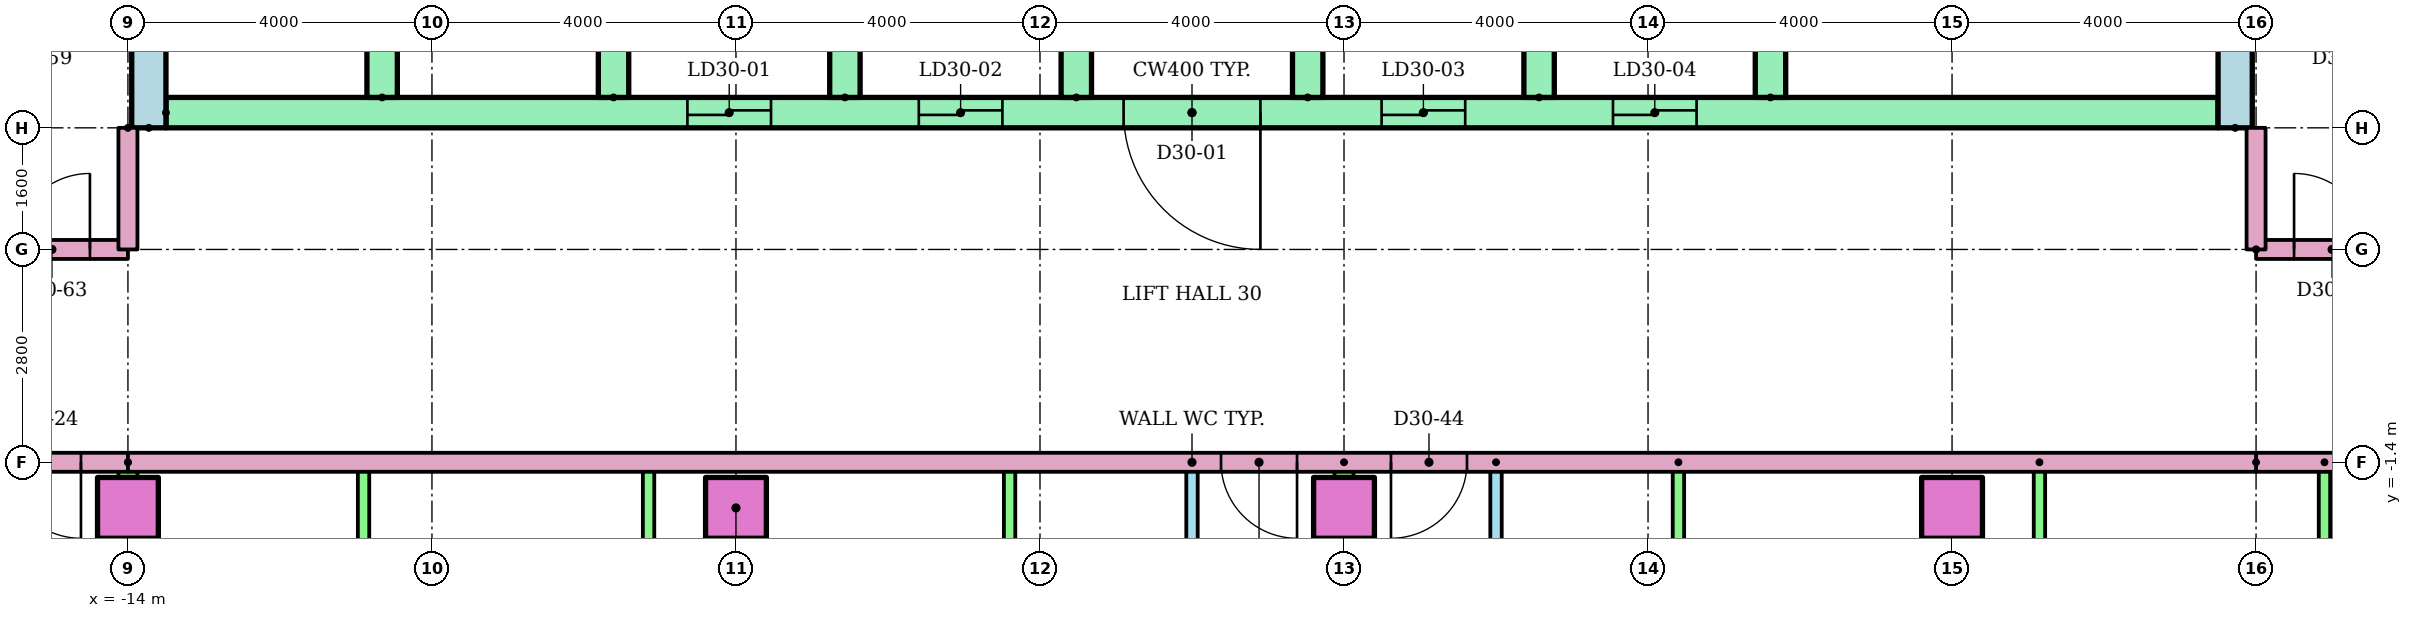
"""IFC4 building model, lengths in metres.
Left out: names, types, materials, properties, quantities, classifications, styles, units other than length and angle.
Written with IfcOpenShell. Run it as: python <this file> out.ifc"""

import sys

from ifc_helpers import new_model, si_unit, direction, frame, frame_2d, origin, origin_2d, place, context, subcontext, project, spatial, rectangle, extrude, element, fill, save


model = new_model("IFC4")
c1 = context("Model", 3, precision=1e-05, world=origin(), true_north=direction((0.0, 1.0)))
c2 = subcontext(c1, "Body", "Model", "MODEL_VIEW")
j1 = project(units=[si_unit("LENGTHUNIT", "METRE"), si_unit("PLANEANGLEUNIT", "RADIAN")], contexts=[c1])
p1 = place(None, origin())
s1 = spatial("IfcSite", under=j1, at=p1, CompositionType="ELEMENT")
p2 = place(p1, origin())
s2 = spatial("IfcBuilding", under=s1, at=p2, CompositionType="ELEMENT")
p3 = place(p2, frame((0.0, 0.0, 119.8)))
s3 = spatial("IfcBuildingStorey", under=s2, at=p3, CompositionType="ELEMENT", Elevation=119.8)
for number, where in (
    (1, (-14.0, -2.0, 0.0)),
    (2, (-6.0, -2.0, 0.0)),
    (3, (2.0, -2.0, 0.0)),
    (4, (10.0, -2.0, 0.0)),
):
    element("IfcColumn", number, at=place(p3, frame(where)), inside=s3, PredefinedType="COLUMN", context=c2, shape_type="SweptSolid", body=[
        extrude(rectangle(XDim=0.8, YDim=0.8, at=origin_2d()), origin(), (0.0, 0.0, 1.0), 3.2),
    ])
for number, where, z_axis, x_axis in (
    (5, (-13.725, 3.0, 0.0), (0.0, 0.0, 1.0), (0.0, 1.0, 0.0)),
    (6, (13.725, 3.0, 0.0), (0.0, 0.0, 1.0), (0.0, 1.0, 0.0)),
):
    element("IfcWall", number, at=place(p3, frame(where, z_axis=z_axis, x_axis=x_axis)), inside=s3, PredefinedType="SHEAR", context=c2, shape_type="SweptSolid", body=[
        extrude(rectangle(XDim=17.0, YDim=0.45, at=frame_2d((8.5, 0.0))), origin(), (0.0, 0.0, 1.0), 2.92),
    ])
p4 = place(p3, frame((-13.5, 3.2, 0.0)))
e7 = element("IfcWall", 7, at=p4, inside=s3, PredefinedType="SHEAR", context=c2, shape_type="SweptSolid", body=[
    extrude(rectangle(XDim=27.0, YDim=0.4, at=frame_2d((13.5, 0.0))), origin(), (0.0, 0.0, 1.0), 2.92),
])
p5 = place(p4, frame((6.861, 0.0, 0.0)))
e8 = element("IfcOpeningElement", 8, at=p5, cuts=e7, PredefinedType="OPENING", context=c2, shape_type="SweptSolid", body=[
    extrude(rectangle(XDim=1.1, YDim=2.1, at=frame_2d((0.55, 1.05))), frame((0.0, 0.21, 0.0), z_axis=(0.0, -1.0, 0.0), x_axis=(1.0, 0.0, 0.0)), (0.0, 0.0, 1.0), 0.42),
])
p6 = place(p4, frame((9.906, 0.0, 0.0)))
e9 = element("IfcOpeningElement", 9, at=p6, cuts=e7, PredefinedType="OPENING", context=c2, shape_type="SweptSolid", body=[
    extrude(rectangle(XDim=1.1, YDim=2.1, at=frame_2d((0.55, 1.05))), frame((0.0, 0.21, 0.0), z_axis=(0.0, -1.0, 0.0), x_axis=(1.0, 0.0, 0.0)), (0.0, 0.0, 1.0), 0.42),
])
p7 = place(p4, frame((15.994, 0.0, 0.0)))
e10 = element("IfcOpeningElement", 10, at=p7, cuts=e7, PredefinedType="OPENING", context=c2, shape_type="SweptSolid", body=[
    extrude(rectangle(XDim=1.1, YDim=2.1, at=frame_2d((0.55, 1.05))), frame((0.0, 0.21, 0.0), z_axis=(0.0, -1.0, 0.0), x_axis=(1.0, 0.0, 0.0)), (0.0, 0.0, 1.0), 0.42),
])
p8 = place(p4, frame((19.039, 0.0, 0.0)))
e11 = element("IfcOpeningElement", 11, at=p8, cuts=e7, PredefinedType="OPENING", context=c2, shape_type="SweptSolid", body=[
    extrude(rectangle(XDim=1.1, YDim=2.1, at=frame_2d((0.55, 1.05))), frame((0.0, 0.21, 0.0), z_axis=(0.0, -1.0, 0.0), x_axis=(1.0, 0.0, 0.0)), (0.0, 0.0, 1.0), 0.42),
])
p9 = place(p4, frame((12.6, 0.0, 0.0)))
e12 = element("IfcOpeningElement", 12, at=p9, cuts=e7, PredefinedType="OPENING", context=c2, shape_type="SweptSolid", body=[
    extrude(rectangle(XDim=1.8, YDim=2.1, at=frame_2d((0.9, 1.05))), frame((0.0, 0.21, 0.0), z_axis=(0.0, -1.0, 0.0), x_axis=(1.0, 0.0, 0.0)), (0.0, 0.0, 1.0), 0.42),
])
for number, where, z_axis, x_axis in (
    (13, (-10.656, 3.4, 0.0), (0.0, 0.0, 1.0), (0.0, 1.0, 0.0)),
    (14, (-7.611, 3.4, 0.0), (0.0, 0.0, 1.0), (0.0, 1.0, 0.0)),
    (15, (-4.567, 3.4, 0.0), (0.0, 0.0, 1.0), (0.0, 1.0, 0.0)),
    (16, (-1.522, 3.4, 0.0), (0.0, 0.0, 1.0), (0.0, 1.0, 0.0)),
    (17, (1.522, 3.4, 0.0), (0.0, 0.0, 1.0), (0.0, 1.0, 0.0)),
    (18, (4.567, 3.4, 0.0), (0.0, 0.0, 1.0), (0.0, 1.0, 0.0)),
    (19, (7.611, 3.4, 0.0), (0.0, 0.0, 1.0), (0.0, 1.0, 0.0)),
):
    element("IfcWall", number, at=place(p3, frame(where, z_axis=z_axis, x_axis=x_axis)), inside=s3, PredefinedType="SHEAR", context=c2, shape_type="SweptSolid", body=[
        extrude(rectangle(XDim=3.0, YDim=0.4, at=frame_2d((1.5, 0.0))), origin(), (0.0, 0.0, 1.0), 2.92),
    ])
p10 = place(p3, frame((0.0, -8.0, 0.0), z_axis=(0.0, 0.0, 1.0), x_axis=(0.0, 1.0, 0.0)))
e20 = element("IfcWall", 20, at=p10, inside=s3, PredefinedType="PARTITIONING", context=c2, shape_type="SweptSolid", body=[
    extrude(rectangle(XDim=6.6, YDim=0.15, at=frame_2d((3.3, 0.0))), origin(), (0.0, 0.0, 1.0), 2.4),
])
p11 = place(p10, frame((4.275, 0.0, 0.0)))
e21 = element("IfcOpeningElement", 21, at=p11, cuts=e20, PredefinedType="OPENING", context=c2, shape_type="SweptSolid", body=[
    extrude(rectangle(XDim=0.9, YDim=2.1, at=frame_2d((0.45, 1.05))), frame((0.0, 0.085, 0.0), z_axis=(0.0, -1.0, 0.0), x_axis=(1.0, 0.0, 0.0)), (0.0, 0.0, 1.0), 0.17),
])
p12 = place(p10, frame((1.025, 0.0, 0.0)))
e22 = element("IfcOpeningElement", 22, at=p12, cuts=e20, PredefinedType="OPENING", context=c2, shape_type="SweptSolid", body=[
    extrude(rectangle(XDim=0.8, YDim=2.1, at=frame_2d((0.4, 1.05))), frame((0.0, 0.085, 0.0), z_axis=(0.0, -1.0, 0.0), x_axis=(1.0, 0.0, 0.0)), (0.0, 0.0, 1.0), 0.17),
])
for number, where, z_axis, x_axis in (
    (23, (-2.4, -8.0, 0.0), (0.0, 0.0, 1.0), (0.0, 1.0, 0.0)),
    (24, (-7.15, -8.0, 0.0), (0.0, 0.0, 1.0), (0.0, 1.0, 0.0)),
    (25, (-10.9, -8.0, 0.0), (0.0, 0.0, 1.0), (0.0, 1.0, 0.0)),
):
    element("IfcWall", number, at=place(p3, frame(where, z_axis=z_axis, x_axis=x_axis)), inside=s3, PredefinedType="PARTITIONING", context=c2, shape_type="SweptSolid", body=[
        extrude(rectangle(XDim=6.6, YDim=0.15, at=frame_2d((3.3, 0.0))), origin(), (0.0, 0.0, 1.0), 2.4),
    ])
p13 = place(p3, frame((-14.0, -1.4, 0.0), z_axis=(0.0, 0.0, 1.0), x_axis=(0.0, -1.0, 0.0)))
e26 = element("IfcWall", 26, at=p13, inside=s3, PredefinedType="PARTITIONING", context=c2, shape_type="SweptSolid", body=[
    extrude(rectangle(XDim=14.91, YDim=0.25, at=frame_2d((7.455, 0.0))), origin(), (0.0, 0.0, 1.0), 2.4),
])
p14 = place(p3, frame((4.0, -1.4, 0.0), z_axis=(0.0, 0.0, 1.0), x_axis=(0.0, -1.0, 0.0)))
e27 = element("IfcWall", 27, at=p14, inside=s3, PredefinedType="PARTITIONING", context=c2, shape_type="SweptSolid", body=[
    extrude(rectangle(XDim=6.6, YDim=0.15, at=frame_2d((3.3, 0.0))), origin(), (0.0, 0.0, 1.0), 2.4),
])
p15 = place(p14, frame((1.425, 0.0, 0.0)))
e28 = element("IfcOpeningElement", 28, at=p15, cuts=e27, PredefinedType="OPENING", context=c2, shape_type="SweptSolid", body=[
    extrude(rectangle(XDim=0.9, YDim=2.1, at=frame_2d((0.45, 1.05))), frame((0.0, 0.085, 0.0), z_axis=(0.0, -1.0, 0.0), x_axis=(1.0, 0.0, 0.0)), (0.0, 0.0, 1.0), 0.17),
])
p16 = place(p14, frame((4.775, 0.0, 0.0)))
e29 = element("IfcOpeningElement", 29, at=p16, cuts=e27, PredefinedType="OPENING", context=c2, shape_type="SweptSolid", body=[
    extrude(rectangle(XDim=0.8, YDim=2.1, at=frame_2d((0.4, 1.05))), frame((0.0, 0.085, 0.0), z_axis=(0.0, -1.0, 0.0), x_axis=(1.0, 0.0, 0.0)), (0.0, 0.0, 1.0), 0.17),
])
for number, where, z_axis, x_axis in (
    (30, (6.4, -1.4, 0.0), (0.0, 0.0, 1.0), (0.0, -1.0, 0.0)),
    (31, (11.15, -1.4, 0.0), (0.0, 0.0, 1.0), (0.0, -1.0, 0.0)),
    (32, (14.9, -1.4, 0.0), (0.0, 0.0, 1.0), (0.0, -1.0, 0.0)),
):
    element("IfcWall", number, at=place(p3, frame(where, z_axis=z_axis, x_axis=x_axis)), inside=s3, PredefinedType="PARTITIONING", context=c2, shape_type="SweptSolid", body=[
        extrude(rectangle(XDim=6.6, YDim=0.15, at=frame_2d((3.3, 0.0))), origin(), (0.0, 0.0, 1.0), 2.4),
    ])
p17 = place(p3, frame((2.0, -1.4, 0.0), z_axis=(0.0, 0.0, 1.0), x_axis=(0.0, -1.0, 0.0)))
e33 = element("IfcWall", 33, at=p17, inside=s3, PredefinedType="PARTITIONING", context=c2, shape_type="SweptSolid", body=[
    extrude(rectangle(XDim=14.91, YDim=0.25, at=frame_2d((7.455, 0.0))), origin(), (0.0, 0.0, 1.0), 2.4),
])
p18 = place(p3, frame((-14.0, -1.4, 0.0), z_axis=(0.0, 0.0, 1.0), x_axis=(-1.0, 0.0, 0.0)))
e34 = element("IfcWall", 34, at=p18, inside=s3, PredefinedType="PARTITIONING", context=c2, shape_type="SweptSolid", body=[
    extrude(rectangle(XDim=15.0, YDim=0.25, at=frame_2d((7.5, 0.0))), origin(), (0.0, 0.0, 1.0), 2.4),
])
p19 = place(p18, frame((8.618, 0.0, 0.0)))
e35 = element("IfcOpeningElement", 35, at=p19, cuts=e34, PredefinedType="OPENING", context=c2, shape_type="SweptSolid", body=[
    extrude(rectangle(XDim=1.0, YDim=2.1, at=frame_2d((0.5, 1.05))), frame((0.0, 0.135, 0.0), z_axis=(0.0, -1.0, 0.0), x_axis=(1.0, 0.0, 0.0)), (0.0, 0.0, 1.0), 0.27),
])
p20 = place(p18, frame((0.618, 0.0, 0.0)))
e36 = element("IfcOpeningElement", 36, at=p20, cuts=e34, PredefinedType="OPENING", context=c2, shape_type="SweptSolid", body=[
    extrude(rectangle(XDim=1.0, YDim=2.1, at=frame_2d((0.5, 1.05))), frame((0.0, 0.135, 0.0), z_axis=(0.0, -1.0, 0.0), x_axis=(1.0, 0.0, 0.0)), (0.0, 0.0, 1.0), 0.27),
])
p21 = place(p3, frame((29.0, -1.4, 0.0), z_axis=(0.0, 0.0, 1.0), x_axis=(-1.0, 0.0, 0.0)))
e37 = element("IfcWall", 37, at=p21, inside=s3, PredefinedType="PARTITIONING", context=c2, shape_type="SweptSolid", body=[
    extrude(rectangle(XDim=15.0, YDim=0.25, at=frame_2d((7.5, 0.0))), origin(), (0.0, 0.0, 1.0), 2.4),
])
p22 = place(p21, frame((9.382, 0.0, 0.0)))
e38 = element("IfcOpeningElement", 38, at=p22, cuts=e37, PredefinedType="OPENING", context=c2, shape_type="SweptSolid", body=[
    extrude(rectangle(XDim=1.0, YDim=2.1, at=frame_2d((0.5, 1.05))), frame((0.0, 0.135, 0.0), z_axis=(0.0, -1.0, 0.0), x_axis=(1.0, 0.0, 0.0)), (0.0, 0.0, 1.0), 0.27),
])
p23 = place(p3, frame((-29.0, 1.4, 0.0)))
e39 = element("IfcWall", 39, at=p23, inside=s3, PredefinedType="PARTITIONING", context=c2, shape_type="SweptSolid", body=[
    extrude(rectangle(XDim=15.0, YDim=0.25, at=frame_2d((7.5, 0.0))), origin(), (0.0, 0.0, 1.0), 2.4),
])
p24 = place(p23, frame((5.382, 0.0, 0.0)))
e40 = element("IfcOpeningElement", 40, at=p24, cuts=e39, PredefinedType="OPENING", context=c2, shape_type="SweptSolid", body=[
    extrude(rectangle(XDim=1.0, YDim=2.1, at=frame_2d((0.5, 1.05))), frame((0.0, 0.135, 0.0), z_axis=(0.0, -1.0, 0.0), x_axis=(1.0, 0.0, 0.0)), (0.0, 0.0, 1.0), 0.27),
])
p25 = place(p23, frame((13.5, 0.0, 0.0)))
e41 = element("IfcOpeningElement", 41, at=p25, cuts=e39, PredefinedType="OPENING", context=c2, shape_type="SweptSolid", body=[
    extrude(rectangle(XDim=1.0, YDim=2.1, at=frame_2d((0.5, 1.05))), frame((0.0, 0.135, 0.0), z_axis=(0.0, -1.0, 0.0), x_axis=(1.0, 0.0, 0.0)), (0.0, 0.0, 1.0), 0.27),
])
p26 = place(p3, frame((14.0, 1.4, 0.0)))
e42 = element("IfcWall", 42, at=p26, inside=s3, PredefinedType="PARTITIONING", context=c2, shape_type="SweptSolid", body=[
    extrude(rectangle(XDim=15.0, YDim=0.25, at=frame_2d((7.5, 0.0))), origin(), (0.0, 0.0, 1.0), 2.4),
])
p27 = place(p26, frame((0.5, 0.0, 0.0)))
e43 = element("IfcOpeningElement", 43, at=p27, cuts=e42, PredefinedType="OPENING", context=c2, shape_type="SweptSolid", body=[
    extrude(rectangle(XDim=1.0, YDim=2.1, at=frame_2d((0.5, 1.05))), frame((0.0, 0.135, 0.0), z_axis=(0.0, -1.0, 0.0), x_axis=(1.0, 0.0, 0.0)), (0.0, 0.0, 1.0), 0.27),
])
p28 = place(p3, frame((14.0, -1.4, 0.0), z_axis=(0.0, 0.0, 1.0), x_axis=(-1.0, 0.0, 0.0)))
e44 = element("IfcWall", 44, at=p28, inside=s3, PredefinedType="PARTITIONING", context=c2, shape_type="SweptSolid", body=[
    extrude(rectangle(XDim=28.0, YDim=0.25, at=frame_2d((14.0, 0.0))), origin(), (0.0, 0.0, 1.0), 2.4),
])
p29 = place(p28, frame((12.618, 0.0, 0.0)))
e45 = element("IfcOpeningElement", 45, at=p29, cuts=e44, PredefinedType="OPENING", context=c2, shape_type="SweptSolid", body=[
    extrude(rectangle(XDim=1.0, YDim=2.1, at=frame_2d((0.5, 1.05))), frame((0.0, 0.135, 0.0), z_axis=(0.0, -1.0, 0.0), x_axis=(1.0, 0.0, 0.0)), (0.0, 0.0, 1.0), 0.27),
])
p30 = place(p28, frame((10.382, 0.0, 0.0)))
e46 = element("IfcOpeningElement", 46, at=p30, cuts=e44, PredefinedType="OPENING", context=c2, shape_type="SweptSolid", body=[
    extrude(rectangle(XDim=1.0, YDim=2.1, at=frame_2d((0.5, 1.05))), frame((0.0, 0.135, 0.0), z_axis=(0.0, -1.0, 0.0), x_axis=(1.0, 0.0, 0.0)), (0.0, 0.0, 1.0), 0.27),
])
for number, where, z_axis, x_axis in (
    (47, (-14.0, 3.0, 0.0), (0.0, 0.0, 1.0), (0.0, -1.0, 0.0)),
    (48, (14.0, 1.4, 0.0), (0.0, 0.0, 1.0), (0.0, 1.0, 0.0)),
):
    element("IfcWall", number, at=place(p3, frame(where, z_axis=z_axis, x_axis=x_axis)), inside=s3, PredefinedType="PARTITIONING", context=c2, shape_type="SweptSolid", body=[
        extrude(rectangle(XDim=1.6, YDim=0.25, at=frame_2d((0.8, 0.0))), origin(), (0.0, 0.0, 1.0), 2.4),
    ])
p31 = place(p5, origin())
e49 = element("IfcDoor", 49, at=p31, inside=s3, OperationType="SLIDING_TO_LEFT", PredefinedType="DOOR", context=c2, shape_type="SweptSolid", body=[
    extrude(rectangle(XDim=1.1, YDim=2.1, at=frame_2d((0.55, 1.05))), frame((0.0, 0.025, 0.0), z_axis=(0.0, -1.0, 0.0), x_axis=(1.0, 0.0, 0.0)), (0.0, 0.0, 1.0), 0.05),
])
fill(e8, e49)
p32 = place(p6, origin())
e50 = element("IfcDoor", 50, at=p32, inside=s3, OperationType="SLIDING_TO_LEFT", PredefinedType="DOOR", context=c2, shape_type="SweptSolid", body=[
    extrude(rectangle(XDim=1.1, YDim=2.1, at=frame_2d((0.55, 1.05))), frame((0.0, 0.025, 0.0), z_axis=(0.0, -1.0, 0.0), x_axis=(1.0, 0.0, 0.0)), (0.0, 0.0, 1.0), 0.05),
])
fill(e9, e50)
p33 = place(p7, origin())
e51 = element("IfcDoor", 51, at=p33, inside=s3, OperationType="SLIDING_TO_LEFT", PredefinedType="DOOR", context=c2, shape_type="SweptSolid", body=[
    extrude(rectangle(XDim=1.1, YDim=2.1, at=frame_2d((0.55, 1.05))), frame((0.0, 0.025, 0.0), z_axis=(0.0, -1.0, 0.0), x_axis=(1.0, 0.0, 0.0)), (0.0, 0.0, 1.0), 0.05),
])
fill(e10, e51)
p34 = place(p8, origin())
e52 = element("IfcDoor", 52, at=p34, inside=s3, OperationType="SLIDING_TO_LEFT", PredefinedType="DOOR", context=c2, shape_type="SweptSolid", body=[
    extrude(rectangle(XDim=1.1, YDim=2.1, at=frame_2d((0.55, 1.05))), frame((0.0, 0.025, 0.0), z_axis=(0.0, -1.0, 0.0), x_axis=(1.0, 0.0, 0.0)), (0.0, 0.0, 1.0), 0.05),
])
fill(e11, e52)
p35 = place(p9, frame((1.8, 0.0, 0.0), z_axis=(0.0, 0.0, 1.0), x_axis=(-1.0, 0.0, 0.0)))
e53 = element("IfcDoor", 53, at=p35, inside=s3, OperationType="DOUBLE_DOOR_SINGLE_SWING", PredefinedType="DOOR", context=c2, shape_type="SweptSolid", body=[
    extrude(rectangle(XDim=1.8, YDim=2.1, at=frame_2d((0.9, 1.05))), frame((0.0, 0.025, 0.0), z_axis=(0.0, -1.0, 0.0), x_axis=(1.0, 0.0, 0.0)), (0.0, 0.0, 1.0), 0.05),
])
fill(e12, e53)
p36 = place(p20, origin())
e54 = element("IfcDoor", 54, at=p36, inside=s3, OperationType="SINGLE_SWING_LEFT", PredefinedType="DOOR", context=c2, shape_type="SweptSolid", body=[
    extrude(rectangle(XDim=1.0, YDim=2.1, at=frame_2d((0.5, 1.05))), frame((0.0, 0.025, 0.0), z_axis=(0.0, -1.0, 0.0), x_axis=(1.0, 0.0, 0.0)), (0.0, 0.0, 1.0), 0.05),
])
fill(e36, e54)
p37 = place(p29, origin())
e55 = element("IfcDoor", 55, at=p37, inside=s3, OperationType="SINGLE_SWING_LEFT", PredefinedType="DOOR", context=c2, shape_type="SweptSolid", body=[
    extrude(rectangle(XDim=1.0, YDim=2.1, at=frame_2d((0.5, 1.05))), frame((0.0, 0.025, 0.0), z_axis=(0.0, -1.0, 0.0), x_axis=(1.0, 0.0, 0.0)), (0.0, 0.0, 1.0), 0.05),
])
fill(e45, e55)
p38 = place(p30, origin())
e56 = element("IfcDoor", 56, at=p38, inside=s3, OperationType="SINGLE_SWING_RIGHT", PredefinedType="DOOR", context=c2, shape_type="SweptSolid", body=[
    extrude(rectangle(XDim=1.0, YDim=2.1, at=frame_2d((0.5, 1.05))), frame((0.0, 0.025, 0.0), z_axis=(0.0, -1.0, 0.0), x_axis=(1.0, 0.0, 0.0)), (0.0, 0.0, 1.0), 0.05),
])
fill(e46, e56)
p39 = place(p25, origin())
e57 = element("IfcDoor", 57, at=p39, inside=s3, OperationType="SINGLE_SWING_RIGHT", PredefinedType="DOOR", context=c2, shape_type="SweptSolid", body=[
    extrude(rectangle(XDim=1.0, YDim=2.1, at=frame_2d((0.5, 1.05))), frame((0.0, 0.025, 0.0), z_axis=(0.0, -1.0, 0.0), x_axis=(1.0, 0.0, 0.0)), (0.0, 0.0, 1.0), 0.05),
])
fill(e41, e57)
p40 = place(p27, origin())
e58 = element("IfcDoor", 58, at=p40, inside=s3, OperationType="SINGLE_SWING_LEFT", PredefinedType="DOOR", context=c2, shape_type="SweptSolid", body=[
    extrude(rectangle(XDim=1.0, YDim=2.1, at=frame_2d((0.5, 1.05))), frame((0.0, 0.025, 0.0), z_axis=(0.0, -1.0, 0.0), x_axis=(1.0, 0.0, 0.0)), (0.0, 0.0, 1.0), 0.05),
])
fill(e43, e58)
save(model, sys.argv[1])
